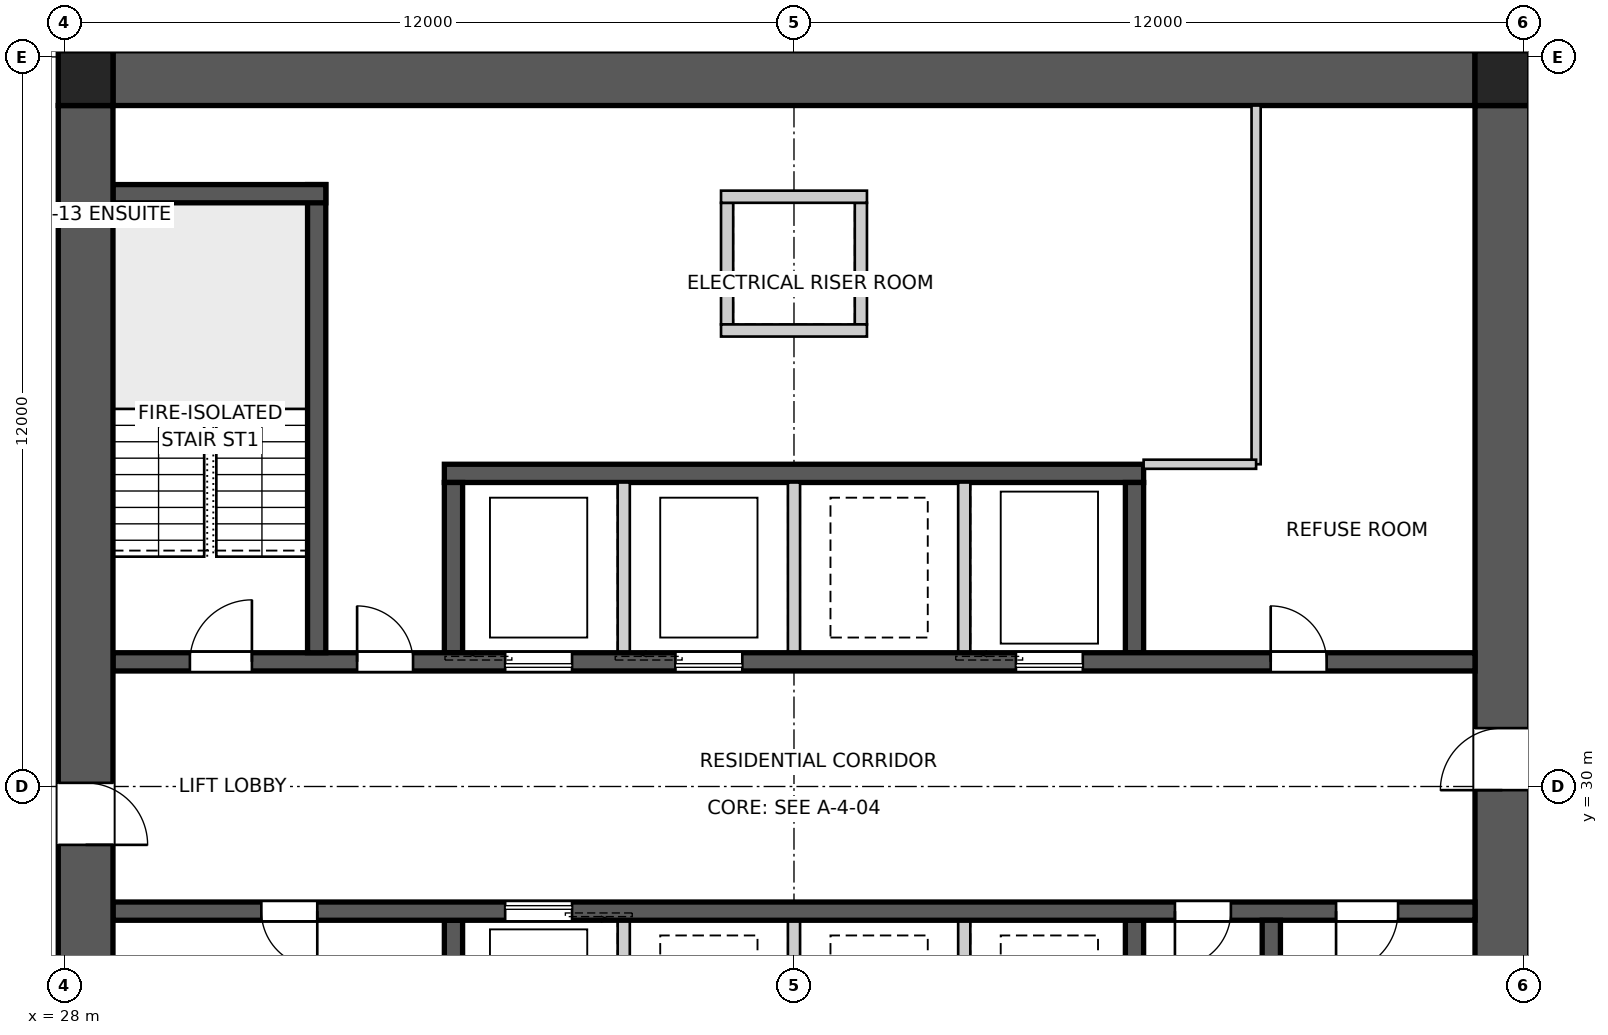
"""IFC4 building model, lengths in metres.
Left out: names, types, materials, properties, quantities, classifications, styles, units other than length and angle.
Written with IfcOpenShell. Run it as: python <this file> out.ifc"""

import sys

from ifc_helpers import new_model, si_unit, direction, frame, frame_2d, origin, origin_2d, place, context, subcontext, project, spatial, polyline, rectangle, outline, extrude, element, fill, save


model = new_model("IFC4")
c1 = context("Model", 3, precision=1e-05, world=origin(), true_north=direction((0.0, 1.0)))
c2 = subcontext(c1, "Body", "Model", "MODEL_VIEW")
j1 = project(units=[si_unit("LENGTHUNIT", "METRE"), si_unit("PLANEANGLEUNIT", "RADIAN")], contexts=[c1])
p1 = place(None, origin())
s1 = spatial("IfcSite", under=j1, at=p1, CompositionType="ELEMENT")
p2 = place(p1, origin())
s2 = spatial("IfcBuilding", under=s1, at=p2, CompositionType="ELEMENT")
p3 = place(p2, frame((0.0, 0.0, 38.8)))
s3 = spatial("IfcBuildingStorey", under=s2, at=p3, CompositionType="ELEMENT", Elevation=38.8)
p4 = place(p3, frame((28.8, 41.65, 0.0), z_axis=(0.0, 0.0, 1.0), x_axis=(1.0, 0.0, 0.0)))
e1 = element("IfcWall", 1, at=p4, inside=s3, PredefinedType="SHEAR", context=c2, shape_type="SweptSolid", body=[
    extrude(outline(polyline([(0.0, -0.45), (22.4, -0.45), (22.4, -0.025), (22.85, -0.025), (22.85, 0.025), (22.4, 0.025), (22.4, 0.45), (0.0, 0.45), (0.0, 0.025), (-0.45, 0.025), (-0.45, -0.025), (0.0, -0.025), (0.0, -0.45)])), origin(), (0.0, 0.0, 1.0), 3.4),
])
p5 = place(p3, frame((51.65, 18.8, 0.0), z_axis=(0.0, 0.0, 1.0), x_axis=(0.0, 1.0, 0.0)))
e2 = element("IfcWall", 2, at=p5, inside=s3, PredefinedType="SHEAR", context=c2, shape_type="SweptSolid", body=[
    extrude(outline(polyline([(0.0, -0.45), (22.4, -0.45), (22.4, -0.025), (22.85, -0.025), (22.85, 0.025), (22.4, 0.025), (22.4, 0.45), (0.0, 0.45), (0.0, 0.025), (-0.45, 0.025), (-0.45, -0.025), (0.0, -0.025), (0.0, -0.45)])), origin(), (0.0, 0.0, 1.0), 3.4),
])
p6 = place(p5, frame((11.14, 0.0, 0.0)))
e3 = element("IfcOpeningElement", 3, at=p6, cuts=e2, PredefinedType="OPENING", context=c2, shape_type="SweptSolid", body=[
    extrude(rectangle(XDim=1.02, YDim=2.4, at=frame_2d((0.51, 1.2))), frame((0.0, 0.46, 0.0), z_axis=(0.0, -1.0, 0.0), x_axis=(1.0, 0.0, 0.0)), (0.0, 0.0, 1.0), 0.92),
])
p7 = place(p3, frame((28.35, 41.2, 0.0), z_axis=(0.0, 0.0, 1.0), x_axis=(0.0, -1.0, 0.0)))
e4 = element("IfcWall", 4, at=p7, inside=s3, PredefinedType="SHEAR", context=c2, shape_type="SweptSolid", body=[
    extrude(outline(polyline([(0.0, -0.45), (22.4, -0.45), (22.4, -0.025), (22.85, -0.025), (22.85, 0.025), (22.4, 0.025), (22.4, 0.45), (0.0, 0.45), (0.0, 0.025), (-0.45, 0.025), (-0.45, -0.025), (0.0, -0.025), (0.0, -0.45)])), origin(), (0.0, 0.0, 1.0), 3.4),
])
p8 = place(p7, frame((11.14, 0.0, 0.0)))
e5 = element("IfcOpeningElement", 5, at=p8, cuts=e4, PredefinedType="OPENING", context=c2, shape_type="SweptSolid", body=[
    extrude(rectangle(XDim=1.02, YDim=2.4, at=frame_2d((0.51, 1.2))), frame((0.0, 0.46, 0.0), z_axis=(0.0, -1.0, 0.0), x_axis=(1.0, 0.0, 0.0)), (0.0, 0.0, 1.0), 0.92),
])
p9 = place(p3, frame((28.8, 32.05, 0.0), z_axis=(0.0, 0.0, 1.0), x_axis=(1.0, 0.0, 0.0)))
e6 = element("IfcWall", 6, at=p9, inside=s3, PredefinedType="SHEAR", context=c2, shape_type="SweptSolid", body=[
    extrude(rectangle(XDim=22.4, YDim=0.3, at=frame_2d((11.2, 0.0))), origin(), (0.0, 0.0, 1.0), 3.4),
])
p10 = place(p9, frame((19.04, 0.0, 0.0)))
e7 = element("IfcOpeningElement", 7, at=p10, cuts=e6, PredefinedType="OPENING", context=c2, shape_type="SweptSolid", body=[
    extrude(rectangle(XDim=0.92, YDim=2.1, at=frame_2d((0.46, 1.05))), frame((0.0, 0.16, 0.0), z_axis=(0.0, -1.0, 0.0), x_axis=(1.0, 0.0, 0.0)), (0.0, 0.0, 1.0), 0.32),
])
p11 = place(p9, frame((1.265, 0.0, 0.0)))
e8 = element("IfcOpeningElement", 8, at=p11, cuts=e6, PredefinedType="OPENING", context=c2, shape_type="SweptSolid", body=[
    extrude(rectangle(XDim=1.02, YDim=2.1, at=frame_2d((0.51, 1.05))), frame((0.0, 0.16, 0.0), z_axis=(0.0, -1.0, 0.0), x_axis=(1.0, 0.0, 0.0)), (0.0, 0.0, 1.0), 0.32),
])
p12 = place(p9, frame((4.015, 0.0, 0.0)))
e9 = element("IfcOpeningElement", 9, at=p12, cuts=e6, PredefinedType="OPENING", context=c2, shape_type="SweptSolid", body=[
    extrude(rectangle(XDim=0.92, YDim=2.1, at=frame_2d((0.46, 1.05))), frame((0.0, 0.16, 0.0), z_axis=(0.0, -1.0, 0.0), x_axis=(1.0, 0.0, 0.0)), (0.0, 0.0, 1.0), 0.32),
])
p13 = place(p9, frame((6.45, 0.0, 0.0)))
e10 = element("IfcOpeningElement", 10, at=p13, cuts=e6, PredefinedType="OPENING", context=c2, shape_type="SweptSolid", body=[
    extrude(rectangle(XDim=1.1, YDim=2.1, at=frame_2d((0.55, 1.05))), frame((0.0, 0.16, 0.0), z_axis=(0.0, -1.0, 0.0), x_axis=(1.0, 0.0, 0.0)), (0.0, 0.0, 1.0), 0.32),
])
p14 = place(p9, frame((9.25, 0.0, 0.0)))
e11 = element("IfcOpeningElement", 11, at=p14, cuts=e6, PredefinedType="OPENING", context=c2, shape_type="SweptSolid", body=[
    extrude(rectangle(XDim=1.1, YDim=2.1, at=frame_2d((0.55, 1.05))), frame((0.0, 0.16, 0.0), z_axis=(0.0, -1.0, 0.0), x_axis=(1.0, 0.0, 0.0)), (0.0, 0.0, 1.0), 0.32),
])
p15 = place(p9, frame((14.85, 0.0, 0.0)))
e12 = element("IfcOpeningElement", 12, at=p15, cuts=e6, PredefinedType="OPENING", context=c2, shape_type="SweptSolid", body=[
    extrude(rectangle(XDim=1.1, YDim=2.1, at=frame_2d((0.55, 1.05))), frame((0.0, 0.16, 0.0), z_axis=(0.0, -1.0, 0.0), x_axis=(1.0, 0.0, 0.0)), (0.0, 0.0, 1.0), 0.32),
])
p16 = place(p3, frame((51.2, 27.95, 0.0), z_axis=(0.0, 0.0, 1.0), x_axis=(-1.0, 0.0, 0.0)))
e13 = element("IfcWall", 13, at=p16, inside=s3, PredefinedType="SHEAR", context=c2, shape_type="SweptSolid", body=[
    extrude(rectangle(XDim=22.4, YDim=0.3, at=frame_2d((11.2, 0.0))), origin(), (0.0, 0.0, 1.0), 3.4),
])
p17 = place(p16, frame((19.04, 0.0, 0.0)))
e14 = element("IfcOpeningElement", 14, at=p17, cuts=e13, PredefinedType="OPENING", context=c2, shape_type="SweptSolid", body=[
    extrude(rectangle(XDim=0.92, YDim=2.1, at=frame_2d((0.46, 1.05))), frame((0.0, 0.16, 0.0), z_axis=(0.0, -1.0, 0.0), x_axis=(1.0, 0.0, 0.0)), (0.0, 0.0, 1.0), 0.32),
])
p18 = place(p16, frame((1.265, 0.0, 0.0)))
e15 = element("IfcOpeningElement", 15, at=p18, cuts=e13, PredefinedType="OPENING", context=c2, shape_type="SweptSolid", body=[
    extrude(rectangle(XDim=1.02, YDim=2.1, at=frame_2d((0.51, 1.05))), frame((0.0, 0.16, 0.0), z_axis=(0.0, -1.0, 0.0), x_axis=(1.0, 0.0, 0.0)), (0.0, 0.0, 1.0), 0.32),
])
p19 = place(p16, frame((4.015, 0.0, 0.0)))
e16 = element("IfcOpeningElement", 16, at=p19, cuts=e13, PredefinedType="OPENING", context=c2, shape_type="SweptSolid", body=[
    extrude(rectangle(XDim=0.92, YDim=2.1, at=frame_2d((0.46, 1.05))), frame((0.0, 0.16, 0.0), z_axis=(0.0, -1.0, 0.0), x_axis=(1.0, 0.0, 0.0)), (0.0, 0.0, 1.0), 0.32),
])
p20 = place(p16, frame((14.85, 0.0, 0.0)))
e17 = element("IfcOpeningElement", 17, at=p20, cuts=e13, PredefinedType="OPENING", context=c2, shape_type="SweptSolid", body=[
    extrude(rectangle(XDim=1.1, YDim=2.1, at=frame_2d((0.55, 1.05))), frame((0.0, 0.16, 0.0), z_axis=(0.0, -1.0, 0.0), x_axis=(1.0, 0.0, 0.0)), (0.0, 0.0, 1.0), 0.32),
])
p21 = place(p3, frame((34.25, 35.15, 0.0), z_axis=(0.0, 0.0, 1.0), x_axis=(1.0, 0.0, 0.0)))
e18 = element("IfcWall", 18, at=p21, inside=s3, PredefinedType="SHEAR", context=c2, shape_type="SweptSolid", body=[
    extrude(rectangle(XDim=11.5, YDim=0.3, at=frame_2d((5.75, 0.0))), origin(), (0.0, 0.0, 1.0), 3.4),
])
for number, where, z_axis, x_axis in (
    (19, (34.4, 32.2, 0.0), (0.0, 0.0, 1.0), (0.0, 1.0, 0.0)),
    (20, (45.6, 27.8, 0.0), (0.0, 0.0, 1.0), (0.0, -1.0, 0.0)),
):
    element("IfcWall", number, at=place(p3, frame(where, z_axis=z_axis, x_axis=x_axis)), inside=s3, PredefinedType="SHEAR", context=c2, shape_type="SweptSolid", body=[
        extrude(rectangle(XDim=2.8, YDim=0.3, at=frame_2d((1.4, 0.0))), origin(), (0.0, 0.0, 1.0), 3.4),
    ])
for number, where, z_axis, x_axis in (
    (21, (37.2, 32.2, 0.0), (0.0, 0.0, 1.0), (0.0, 1.0, 0.0)),
    (22, (42.8, 27.8, 0.0), (0.0, 0.0, 1.0), (0.0, -1.0, 0.0)),
    (23, (40.0, 32.2, 0.0), (0.0, 0.0, 1.0), (0.0, 1.0, 0.0)),
    (24, (40.0, 27.8, 0.0), (0.0, 0.0, 1.0), (0.0, -1.0, 0.0)),
    (25, (42.8, 32.2, 0.0), (0.0, 0.0, 1.0), (0.0, 1.0, 0.0)),
    (26, (37.2, 27.8, 0.0), (0.0, 0.0, 1.0), (0.0, -1.0, 0.0)),
):
    element("IfcWall", number, at=place(p3, frame(where, z_axis=z_axis, x_axis=x_axis)), inside=s3, PredefinedType="SOLIDWALL", context=c2, shape_type="SweptSolid", body=[
        extrude(rectangle(XDim=2.8, YDim=0.2, at=frame_2d((1.4, 0.0))), origin(), (0.0, 0.0, 1.0), 3.4),
    ])
for number, where, z_axis, x_axis in (
    (27, (45.6, 32.2, 0.0), (0.0, 0.0, 1.0), (0.0, 1.0, 0.0)),
    (28, (34.4, 27.8, 0.0), (0.0, 0.0, 1.0), (0.0, -1.0, 0.0)),
):
    element("IfcWall", number, at=place(p3, frame(where, z_axis=z_axis, x_axis=x_axis)), inside=s3, PredefinedType="SHEAR", context=c2, shape_type="SweptSolid", body=[
        extrude(rectangle(XDim=2.8, YDim=0.3, at=frame_2d((1.4, 0.0))), origin(), (0.0, 0.0, 1.0), 3.4),
    ])
p22 = place(p3, frame((32.15, 32.2, 0.0), z_axis=(0.0, 0.0, 1.0), x_axis=(0.0, 1.0, 0.0)))
e29 = element("IfcWall", 29, at=p22, inside=s3, PredefinedType="SHEAR", context=c2, shape_type="SweptSolid", body=[
    extrude(rectangle(XDim=7.7, YDim=0.3, at=frame_2d((3.85, 0.0))), origin(), (0.0, 0.0, 1.0), 3.4),
])
p23 = place(p3, frame((28.8, 39.75, 0.0), z_axis=(0.0, 0.0, 1.0), x_axis=(1.0, 0.0, 0.0)))
e30 = element("IfcWall", 30, at=p23, inside=s3, PredefinedType="SHEAR", context=c2, shape_type="SweptSolid", body=[
    extrude(rectangle(XDim=3.5, YDim=0.3, at=frame_2d((1.75, 0.0))), origin(), (0.0, 0.0, 1.0), 3.4),
])
p24 = place(p3, frame((47.85, 27.8, 0.0), z_axis=(0.0, 0.0, 1.0), x_axis=(0.0, -1.0, 0.0)))
e31 = element("IfcWall", 31, at=p24, inside=s3, PredefinedType="SHEAR", context=c2, shape_type="SweptSolid", body=[
    extrude(rectangle(XDim=7.7, YDim=0.3, at=frame_2d((3.85, 0.0))), origin(), (0.0, 0.0, 1.0), 3.4),
])
for number, where, z_axis, x_axis in (
    (32, (38.9, 37.6, 0.0), (0.0, 0.0, 1.0), (0.0, 1.0, 0.0)),
    (33, (41.1, 37.6, 0.0), (0.0, 0.0, 1.0), (0.0, 1.0, 0.0)),
):
    element("IfcWall", number, at=place(p3, frame(where, z_axis=z_axis, x_axis=x_axis)), inside=s3, PredefinedType="SOLIDWALL", context=c2, shape_type="SweptSolid", body=[
        extrude(rectangle(XDim=2.0, YDim=0.2, at=frame_2d((1.0, 0.0))), origin(), (0.0, 0.0, 1.0), 3.4),
    ])
for number, where, z_axis, x_axis in (
    (34, (38.8, 37.5, 0.0), (0.0, 0.0, 1.0), (1.0, 0.0, 0.0)),
    (35, (38.8, 39.7, 0.0), (0.0, 0.0, 1.0), (1.0, 0.0, 0.0)),
):
    element("IfcWall", number, at=place(p3, frame(where, z_axis=z_axis, x_axis=x_axis)), inside=s3, PredefinedType="SOLIDWALL", context=c2, shape_type="SweptSolid", body=[
        extrude(rectangle(XDim=2.4, YDim=0.2, at=frame_2d((1.2, 0.0))), origin(), (0.0, 0.0, 1.0), 3.4),
    ])
for number, where, z_axis, x_axis in (
    (36, (51.65, 41.65, 0.0), (0.0, 0.0, 1.0), (1.0, 0.0, 0.0)),
    (37, (28.35, 41.65, 0.0), (0.0, 0.0, 1.0), (1.0, 0.0, 0.0)),
):
    element("IfcColumn", number, at=place(p3, frame(where, z_axis=z_axis, x_axis=x_axis)), inside=s3, PredefinedType="COLUMN", context=c2, shape_type="SweptSolid", body=[
        extrude(rectangle(XDim=0.9, YDim=0.9, at=origin_2d()), origin(), (0.0, 0.0, 1.0), 3.4),
    ])
p25 = place(p3, frame((47.6, 41.2, 0.0), z_axis=(0.0, 0.0, 1.0), x_axis=(0.0, -1.0, 0.0)))
e38 = element("IfcWall", 38, at=p25, inside=s3, PredefinedType="SOLIDWALL", context=c2, shape_type="SweptSolid", body=[
    extrude(rectangle(XDim=5.9, YDim=0.15, at=frame_2d((2.95, 0.0))), origin(), (0.0, 0.0, 1.0), 3.2),
])
p26 = place(p3, frame((47.6, 35.3, 0.0), z_axis=(0.0, 0.0, 1.0), x_axis=(-1.0, 0.0, 0.0)))
e39 = element("IfcWall", 39, at=p26, inside=s3, PredefinedType="SOLIDWALL", context=c2, shape_type="SweptSolid", body=[
    extrude(rectangle(XDim=1.85, YDim=0.15, at=frame_2d((0.925, 0.0))), origin(), (0.0, 0.0, 1.0), 3.2),
])
p27 = place(p10, origin())
e40 = element("IfcDoor", 40, at=p27, inside=s3, OperationType="SINGLE_SWING_LEFT", PredefinedType="DOOR", context=c2, shape_type="SweptSolid", body=[
    extrude(rectangle(XDim=0.92, YDim=2.1, at=frame_2d((0.46, 1.05))), frame((0.0, 0.025, 0.0), z_axis=(0.0, -1.0, 0.0), x_axis=(1.0, 0.0, 0.0)), (0.0, 0.0, 1.0), 0.05),
])
fill(e7, e40)
p28 = place(p17, origin())
e41 = element("IfcDoor", 41, at=p28, inside=s3, OperationType="SINGLE_SWING_LEFT", PredefinedType="DOOR", context=c2, shape_type="SweptSolid", body=[
    extrude(rectangle(XDim=0.92, YDim=2.1, at=frame_2d((0.46, 1.05))), frame((0.0, 0.025, 0.0), z_axis=(0.0, -1.0, 0.0), x_axis=(1.0, 0.0, 0.0)), (0.0, 0.0, 1.0), 0.05),
])
fill(e14, e41)
p29 = place(p18, origin())
e42 = element("IfcDoor", 42, at=p29, inside=s3, OperationType="SINGLE_SWING_RIGHT", PredefinedType="DOOR", context=c2, shape_type="SweptSolid", body=[
    extrude(rectangle(XDim=1.02, YDim=2.1, at=frame_2d((0.51, 1.05))), frame((0.0, 0.025, 0.0), z_axis=(0.0, -1.0, 0.0), x_axis=(1.0, 0.0, 0.0)), (0.0, 0.0, 1.0), 0.05),
])
fill(e15, e42)
p30 = place(p11, origin())
e43 = element("IfcDoor", 43, at=p30, inside=s3, OperationType="SINGLE_SWING_RIGHT", PredefinedType="DOOR", context=c2, shape_type="SweptSolid", body=[
    extrude(rectangle(XDim=1.02, YDim=2.1, at=frame_2d((0.51, 1.05))), frame((0.0, 0.025, 0.0), z_axis=(0.0, -1.0, 0.0), x_axis=(1.0, 0.0, 0.0)), (0.0, 0.0, 1.0), 0.05),
])
fill(e8, e43)
p31 = place(p12, origin())
e44 = element("IfcDoor", 44, at=p31, inside=s3, OperationType="SINGLE_SWING_LEFT", PredefinedType="DOOR", context=c2, shape_type="SweptSolid", body=[
    extrude(rectangle(XDim=0.92, YDim=2.1, at=frame_2d((0.46, 1.05))), frame((0.0, 0.025, 0.0), z_axis=(0.0, -1.0, 0.0), x_axis=(1.0, 0.0, 0.0)), (0.0, 0.0, 1.0), 0.05),
])
fill(e9, e44)
p32 = place(p19, origin())
e45 = element("IfcDoor", 45, at=p32, inside=s3, OperationType="SINGLE_SWING_RIGHT", PredefinedType="DOOR", context=c2, shape_type="SweptSolid", body=[
    extrude(rectangle(XDim=0.92, YDim=2.1, at=frame_2d((0.46, 1.05))), frame((0.0, 0.025, 0.0), z_axis=(0.0, -1.0, 0.0), x_axis=(1.0, 0.0, 0.0)), (0.0, 0.0, 1.0), 0.05),
])
fill(e16, e45)
p33 = place(p6, origin())
e46 = element("IfcDoor", 46, at=p33, inside=s3, OperationType="SINGLE_SWING_LEFT", PredefinedType="DOOR", context=c2, shape_type="SweptSolid", body=[
    extrude(rectangle(XDim=1.02, YDim=2.4, at=frame_2d((0.51, 1.2))), frame((0.0, 0.025, 0.0), z_axis=(0.0, -1.0, 0.0), x_axis=(1.0, 0.0, 0.0)), (0.0, 0.0, 1.0), 0.05),
])
fill(e3, e46)
p34 = place(p8, origin())
e47 = element("IfcDoor", 47, at=p34, inside=s3, OperationType="SINGLE_SWING_RIGHT", PredefinedType="DOOR", context=c2, shape_type="SweptSolid", body=[
    extrude(rectangle(XDim=1.02, YDim=2.4, at=frame_2d((0.51, 1.2))), frame((0.0, 0.025, 0.0), z_axis=(0.0, -1.0, 0.0), x_axis=(1.0, 0.0, 0.0)), (0.0, 0.0, 1.0), 0.05),
])
fill(e5, e47)
p35 = place(p13, origin())
e48 = element("IfcDoor", 48, at=p35, inside=s3, OperationType="SLIDING_TO_LEFT", PredefinedType="DOOR", context=c2, shape_type="SweptSolid", body=[
    extrude(rectangle(XDim=1.1, YDim=2.1, at=frame_2d((0.55, 1.05))), frame((0.0, 0.025, 0.0), z_axis=(0.0, -1.0, 0.0), x_axis=(1.0, 0.0, 0.0)), (0.0, 0.0, 1.0), 0.05),
])
fill(e10, e48)
p36 = place(p14, origin())
e49 = element("IfcDoor", 49, at=p36, inside=s3, OperationType="SLIDING_TO_LEFT", PredefinedType="DOOR", context=c2, shape_type="SweptSolid", body=[
    extrude(rectangle(XDim=1.1, YDim=2.1, at=frame_2d((0.55, 1.05))), frame((0.0, 0.025, 0.0), z_axis=(0.0, -1.0, 0.0), x_axis=(1.0, 0.0, 0.0)), (0.0, 0.0, 1.0), 0.05),
])
fill(e11, e49)
p37 = place(p15, origin())
e50 = element("IfcDoor", 50, at=p37, inside=s3, OperationType="SLIDING_TO_LEFT", PredefinedType="DOOR", context=c2, shape_type="SweptSolid", body=[
    extrude(rectangle(XDim=1.1, YDim=2.1, at=frame_2d((0.55, 1.05))), frame((0.0, 0.025, 0.0), z_axis=(0.0, -1.0, 0.0), x_axis=(1.0, 0.0, 0.0)), (0.0, 0.0, 1.0), 0.05),
])
fill(e12, e50)
p38 = place(p20, origin())
e51 = element("IfcDoor", 51, at=p38, inside=s3, OperationType="SLIDING_TO_LEFT", PredefinedType="DOOR", context=c2, shape_type="SweptSolid", body=[
    extrude(rectangle(XDim=1.1, YDim=2.1, at=frame_2d((0.55, 1.05))), frame((0.0, 0.025, 0.0), z_axis=(0.0, -1.0, 0.0), x_axis=(1.0, 0.0, 0.0)), (0.0, 0.0, 1.0), 0.05),
])
fill(e17, e51)
save(model, sys.argv[1])
